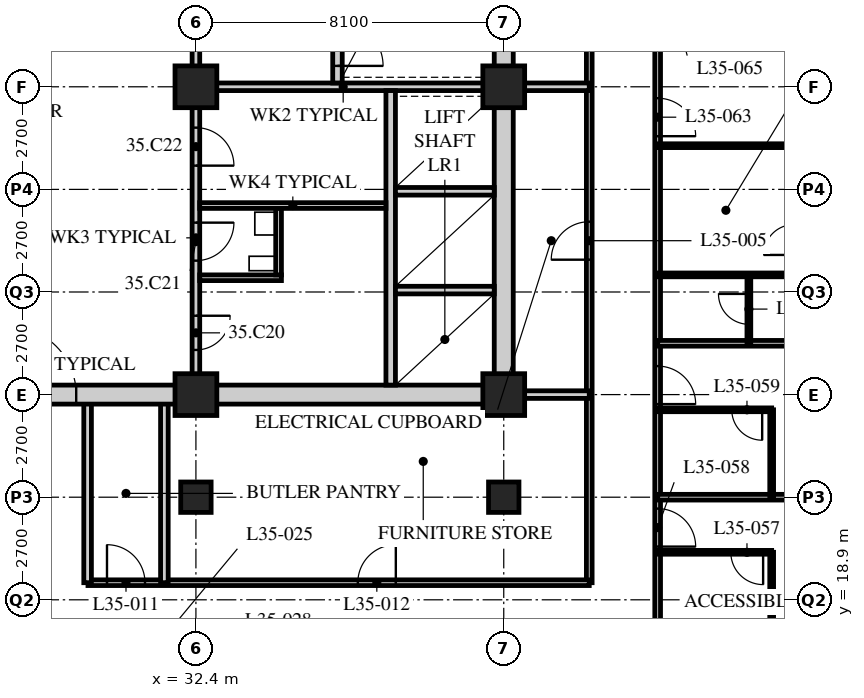
"""IFC4 building model, lengths in metres.
Left out: names, types, materials, properties, quantities, classifications, styles, units other than length and angle.
Written with IfcOpenShell. Run it as: python <this file> out.ifc"""

import sys

from ifc_helpers import new_model, si_unit, direction, frame, frame_2d, origin, origin_2d, place, context, subcontext, project, spatial, rectangle, hollow_rectangle, extrude, element, fill, save


model = new_model("IFC4")
c1 = context("Model", 3, precision=1e-05, world=origin(), true_north=direction((0.0, 1.0)))
c2 = subcontext(c1, "Body", "Model", "MODEL_VIEW")
j1 = project(units=[si_unit("LENGTHUNIT", "METRE"), si_unit("PLANEANGLEUNIT", "RADIAN")], contexts=[c1])
p1 = place(None, origin())
s1 = spatial("IfcSite", under=j1, at=p1, CompositionType="ELEMENT")
p2 = place(p1, origin())
s2 = spatial("IfcBuilding", under=s1, at=p2, CompositionType="ELEMENT")
p3 = place(p2, frame((0.0, 0.0, 137.4)))
s3 = spatial("IfcBuildingStorey", under=s2, at=p3, CompositionType="ELEMENT", Elevation=137.4)
p4 = place(p3, frame((32.4, 21.6, 0.0), z_axis=(0.0, 0.0, 1.0), x_axis=(1.0, 0.0, 0.0)))
e1 = element("IfcColumn", 1, at=p4, inside=s3, PredefinedType="COLUMN", context=c2, shape_type="SweptSolid", body=[
    extrude(hollow_rectangle(XDim=0.8, YDim=0.8, WallThickness=0.08, at=origin_2d()), origin(), (0.0, 0.0, 1.0), 3.4),
])
for number, where, z_axis, x_axis in (
    (2, (32.4, 24.3, 0.0), (0.0, 0.0, 1.0), (1.0, 0.0, 0.0)),
    (3, (32.4, 32.4, 0.0), (0.0, 0.0, 1.0), (1.0, 0.0, 0.0)),
):
    element("IfcColumn", number, at=place(p3, frame(where, z_axis=z_axis, x_axis=x_axis)), inside=s3, PredefinedType="COLUMN", context=c2, shape_type="SweptSolid", body=[
        extrude(hollow_rectangle(XDim=1.1, YDim=1.1, WallThickness=0.1, at=origin_2d()), origin(), (0.0, 0.0, 1.0), 3.4),
    ])
p5 = place(p3, frame((40.5, 21.6, 0.0), z_axis=(0.0, 0.0, 1.0), x_axis=(1.0, 0.0, 0.0)))
e4 = element("IfcColumn", 4, at=p5, inside=s3, PredefinedType="COLUMN", context=c2, shape_type="SweptSolid", body=[
    extrude(hollow_rectangle(XDim=0.8, YDim=0.8, WallThickness=0.08, at=origin_2d()), origin(), (0.0, 0.0, 1.0), 3.4),
])
for number, where, z_axis, x_axis in (
    (5, (40.5, 24.3, 0.0), (0.0, 0.0, 1.0), (1.0, 0.0, 0.0)),
    (6, (40.5, 32.4, 0.0), (0.0, 0.0, 1.0), (1.0, 0.0, 0.0)),
):
    element("IfcColumn", number, at=place(p3, frame(where, z_axis=z_axis, x_axis=x_axis)), inside=s3, PredefinedType="COLUMN", context=c2, shape_type="SweptSolid", body=[
        extrude(hollow_rectangle(XDim=1.1, YDim=1.1, WallThickness=0.1, at=origin_2d()), origin(), (0.0, 0.0, 1.0), 3.4),
    ])
p6 = place(p3, frame((44.55, 17.55, 0.0), z_axis=(0.0, 0.0, 1.0), x_axis=(0.0, 1.0, 0.0)))
e7 = element("IfcWall", 7, at=p6, inside=s3, PredefinedType="PARTITIONING", context=c2, shape_type="SweptSolid", body=[
    extrude(rectangle(XDim=28.35, YDim=0.15, at=frame_2d((14.175, 0.0))), origin(), (0.0, 0.0, 1.0), 3.19),
])
p7 = place(p6, frame((2.75, 0.0, 0.0)))
e8 = element("IfcOpeningElement", 8, at=p7, cuts=e7, PredefinedType="OPENING", context=c2, shape_type="SweptSolid", body=[
    extrude(rectangle(XDim=1.0, YDim=2.1, at=frame_2d((0.5, 1.05))), frame((0.0, 0.085, 0.0), z_axis=(0.0, -1.0, 0.0), x_axis=(1.0, 0.0, 0.0)), (0.0, 0.0, 1.0), 0.17),
])
p8 = place(p6, frame((6.5, 0.0, 0.0)))
e9 = element("IfcOpeningElement", 9, at=p8, cuts=e7, PredefinedType="OPENING", context=c2, shape_type="SweptSolid", body=[
    extrude(rectangle(XDim=1.0, YDim=2.1, at=frame_2d((0.5, 1.05))), frame((0.0, 0.085, 0.0), z_axis=(0.0, -1.0, 0.0), x_axis=(1.0, 0.0, 0.0)), (0.0, 0.0, 1.0), 0.17),
])
p9 = place(p6, frame((13.55, 0.0, 0.0)))
e10 = element("IfcOpeningElement", 10, at=p9, cuts=e7, PredefinedType="OPENING", context=c2, shape_type="SweptSolid", body=[
    extrude(rectangle(XDim=1.0, YDim=2.1, at=frame_2d((0.5, 1.05))), frame((0.0, 0.085, 0.0), z_axis=(0.0, -1.0, 0.0), x_axis=(1.0, 0.0, 0.0)), (0.0, 0.0, 1.0), 0.17),
])
p10 = place(p6, frame((18.1, 0.0, 0.0)))
e11 = element("IfcOpeningElement", 11, at=p10, cuts=e7, PredefinedType="OPENING", context=c2, shape_type="SweptSolid", body=[
    extrude(rectangle(XDim=1.0, YDim=2.1, at=frame_2d((0.5, 1.05))), frame((0.0, 0.085, 0.0), z_axis=(0.0, -1.0, 0.0), x_axis=(1.0, 0.0, 0.0)), (0.0, 0.0, 1.0), 0.17),
])
p11 = place(p6, frame((26.75, 0.0, 0.0)))
e12 = element("IfcOpeningElement", 12, at=p11, cuts=e7, PredefinedType="OPENING", context=c2, shape_type="SweptSolid", body=[
    extrude(rectangle(XDim=1.0, YDim=2.1, at=frame_2d((0.5, 1.05))), frame((0.0, 0.085, 0.0), z_axis=(0.0, -1.0, 0.0), x_axis=(1.0, 0.0, 0.0)), (0.0, 0.0, 1.0), 0.17),
])
p12 = place(p3, frame((42.75, 19.35, 0.0), z_axis=(0.0, 0.0, 1.0), x_axis=(0.0, 1.0, 0.0)))
e13 = element("IfcWall", 13, at=p12, inside=s3, PredefinedType="PARTITIONING", context=c2, shape_type="SweptSolid", body=[
    extrude(rectangle(XDim=24.75, YDim=0.15, at=frame_2d((12.375, 0.0))), origin(), (0.0, 0.0, 1.0), 3.19),
])
p13 = place(p12, frame((8.5, 0.0, 0.0)))
e14 = element("IfcOpeningElement", 14, at=p13, cuts=e13, PredefinedType="OPENING", context=c2, shape_type="SweptSolid", body=[
    extrude(rectangle(XDim=1.0, YDim=2.1, at=frame_2d((0.5, 1.05))), frame((0.0, 0.085, 0.0), z_axis=(0.0, -1.0, 0.0), x_axis=(1.0, 0.0, 0.0)), (0.0, 0.0, 1.0), 0.17),
])
p14 = place(p12, frame((16.6, 0.0, 0.0)))
e15 = element("IfcOpeningElement", 15, at=p14, cuts=e13, PredefinedType="OPENING", context=c2, shape_type="SweptSolid", body=[
    extrude(rectangle(XDim=1.0, YDim=2.1, at=frame_2d((0.5, 1.05))), frame((0.0, 0.085, 0.0), z_axis=(0.0, -1.0, 0.0), x_axis=(1.0, 0.0, 0.0)), (0.0, 0.0, 1.0), 0.17),
])
p15 = place(p3, frame((29.56, 19.35, 0.0), z_axis=(0.0, 0.0, 1.0), x_axis=(1.0, 0.0, 0.0)))
e16 = element("IfcWall", 16, at=p15, inside=s3, PredefinedType="PARTITIONING", context=c2, shape_type="SweptSolid", body=[
    extrude(rectangle(XDim=13.19, YDim=0.15, at=frame_2d((6.595, 0.0))), origin(), (0.0, 0.0, 1.0), 3.19),
])
p16 = place(p15, frame((0.5, 0.0, 0.0)))
e17 = element("IfcOpeningElement", 17, at=p16, cuts=e16, PredefinedType="OPENING", context=c2, shape_type="SweptSolid", body=[
    extrude(rectangle(XDim=1.0, YDim=2.1, at=frame_2d((0.5, 1.05))), frame((0.0, 0.085, 0.0), z_axis=(0.0, -1.0, 0.0), x_axis=(1.0, 0.0, 0.0)), (0.0, 0.0, 1.0), 0.17),
])
p17 = place(p15, frame((7.1, 0.0, 0.0)))
e18 = element("IfcOpeningElement", 18, at=p17, cuts=e16, PredefinedType="OPENING", context=c2, shape_type="SweptSolid", body=[
    extrude(rectangle(XDim=1.0, YDim=2.1, at=frame_2d((0.5, 1.05))), frame((0.0, 0.085, 0.0), z_axis=(0.0, -1.0, 0.0), x_axis=(1.0, 0.0, 0.0)), (0.0, 0.0, 1.0), 0.17),
])
p18 = place(p3, frame((40.5, 32.4, 0.0), z_axis=(0.0, 0.0, 1.0), x_axis=(1.0, 0.0, 0.0)))
e19 = element("IfcWall", 19, at=p18, inside=s3, PredefinedType="SOLIDWALL", context=c2, shape_type="SweptSolid", body=[
    extrude(rectangle(XDim=2.25, YDim=0.2, at=frame_2d((1.125, 0.0))), origin(), (0.0, 0.0, 1.0), 3.19),
])
for number, where, z_axis, x_axis in (
    (20, (31.57, 19.35, 0.0), (0.0, 0.0, 1.0), (0.0, 1.0, 0.0)),
    (21, (29.55, 19.35, 0.0), (0.0, 0.0, 1.0), (0.0, 1.0, 0.0)),
):
    element("IfcWall", number, at=place(p3, frame(where, z_axis=z_axis, x_axis=x_axis)), inside=s3, PredefinedType="SOLIDWALL", context=c2, shape_type="SweptSolid", body=[
        extrude(rectangle(XDim=4.95, YDim=0.2, at=frame_2d((2.475, 0.0))), origin(), (0.0, 0.0, 1.0), 3.19),
    ])
p19 = place(p3, frame((40.5, 24.3, 0.0), z_axis=(0.0, 0.0, 1.0), x_axis=(1.0, 0.0, 0.0)))
e22 = element("IfcWall", 22, at=p19, inside=s3, PredefinedType="SOLIDWALL", context=c2, shape_type="SweptSolid", body=[
    extrude(rectangle(XDim=2.25, YDim=0.2, at=frame_2d((1.125, 0.0))), origin(), (0.0, 0.0, 1.0), 3.19),
])
p20 = place(p3, frame((47.55, 17.55, 0.0), z_axis=(0.0, 0.0, 1.0), x_axis=(0.0, 1.0, 0.0)))
e23 = element("IfcWall", 23, at=p20, inside=s3, PredefinedType="PARTITIONING", context=c2, shape_type="SweptSolid", body=[
    extrude(rectangle(XDim=2.6, YDim=0.1, at=frame_2d((1.3, 0.0))), origin(), (0.0, 0.0, 1.0), 3.19),
])
p21 = place(p3, frame((44.55, 20.15, 0.0), z_axis=(0.0, 0.0, 1.0), x_axis=(1.0, 0.0, 0.0)))
e24 = element("IfcWall", 24, at=p21, inside=s3, PredefinedType="PARTITIONING", context=c2, shape_type="SweptSolid", body=[
    extrude(rectangle(XDim=3.0, YDim=0.1, at=frame_2d((1.5, 0.0))), origin(), (0.0, 0.0, 1.0), 3.19),
])
p22 = place(p21, frame((1.925, 0.0, 0.0)))
e25 = element("IfcOpeningElement", 25, at=p22, cuts=e24, PredefinedType="OPENING", context=c2, shape_type="SweptSolid", body=[
    extrude(rectangle(XDim=0.85, YDim=2.1, at=frame_2d((0.425, 1.05))), frame((0.0, 0.06, 0.0), z_axis=(0.0, -1.0, 0.0), x_axis=(1.0, 0.0, 0.0)), (0.0, 0.0, 1.0), 0.12),
])
p23 = place(p3, frame((44.55, 21.6, 0.0), z_axis=(0.0, 0.0, 1.0), x_axis=(1.0, 0.0, 0.0)))
e26 = element("IfcWall", 26, at=p23, inside=s3, PredefinedType="PARTITIONING", context=c2, shape_type="SweptSolid", body=[
    extrude(rectangle(XDim=11.85, YDim=0.15, at=frame_2d((5.925, 0.0))), origin(), (0.0, 0.0, 1.0), 2.578),
])
p24 = place(p3, frame((47.55, 21.6, 0.0), z_axis=(0.0, 0.0, 1.0), x_axis=(0.0, 1.0, 0.0)))
e27 = element("IfcWall", 27, at=p24, inside=s3, PredefinedType="PARTITIONING", context=c2, shape_type="SweptSolid", body=[
    extrude(rectangle(XDim=2.3, YDim=0.1, at=frame_2d((1.15, 0.0))), origin(), (0.0, 0.0, 1.0), 3.19),
])
p25 = place(p3, frame((44.55, 23.9, 0.0), z_axis=(0.0, 0.0, 1.0), x_axis=(1.0, 0.0, 0.0)))
e28 = element("IfcWall", 28, at=p25, inside=s3, PredefinedType="PARTITIONING", context=c2, shape_type="SweptSolid", body=[
    extrude(rectangle(XDim=3.0, YDim=0.1, at=frame_2d((1.5, 0.0))), origin(), (0.0, 0.0, 1.0), 3.19),
])
p26 = place(p25, frame((1.95, 0.0, 0.0)))
e29 = element("IfcOpeningElement", 29, at=p26, cuts=e28, PredefinedType="OPENING", context=c2, shape_type="SweptSolid", body=[
    extrude(rectangle(XDim=0.8, YDim=2.1, at=frame_2d((0.4, 1.05))), frame((0.0, 0.06, 0.0), z_axis=(0.0, -1.0, 0.0), x_axis=(1.0, 0.0, 0.0)), (0.0, 0.0, 1.0), 0.12),
])
p27 = place(p3, frame((44.55, 25.65, 0.0), z_axis=(0.0, 0.0, 1.0), x_axis=(1.0, 0.0, 0.0)))
e30 = element("IfcWall", 30, at=p27, inside=s3, PredefinedType="PARTITIONING", context=c2, shape_type="SweptSolid", body=[
    extrude(rectangle(XDim=11.85, YDim=0.15, at=frame_2d((5.925, 0.0))), origin(), (0.0, 0.0, 1.0), 3.19),
])
p28 = place(p3, frame((46.95, 25.65, 0.0), z_axis=(0.0, 0.0, 1.0), x_axis=(0.0, 1.0, 0.0)))
e31 = element("IfcWall", 31, at=p28, inside=s3, PredefinedType="PARTITIONING", context=c2, shape_type="SweptSolid", body=[
    extrude(rectangle(XDim=1.8, YDim=0.1, at=frame_2d((0.9, 0.0))), origin(), (0.0, 0.0, 1.0), 3.19),
])
p29 = place(p28, frame((0.5, 0.0, 0.0)))
e32 = element("IfcOpeningElement", 32, at=p29, cuts=e31, PredefinedType="OPENING", context=c2, shape_type="SweptSolid", body=[
    extrude(rectangle(XDim=0.8, YDim=2.1, at=frame_2d((0.4, 1.05))), frame((0.0, 0.06, 0.0), z_axis=(0.0, -1.0, 0.0), x_axis=(1.0, 0.0, 0.0)), (0.0, 0.0, 1.0), 0.12),
])
for number, where, z_axis, x_axis in (
    (33, (44.55, 27.45, 0.0), (0.0, 0.0, 1.0), (1.0, 0.0, 0.0)),
    (34, (44.55, 30.85, 0.0), (0.0, 0.0, 1.0), (1.0, 0.0, 0.0)),
):
    element("IfcWall", number, at=place(p3, frame(where, z_axis=z_axis, x_axis=x_axis)), inside=s3, PredefinedType="PARTITIONING", context=c2, shape_type="SweptSolid", body=[
        extrude(rectangle(XDim=3.59, YDim=0.1, at=frame_2d((1.795, 0.0))), origin(), (0.0, 0.0, 1.0), 3.19),
    ])
p30 = place(p3, frame((15.95, 24.3, 0.0), z_axis=(0.0, 0.0, 1.0), x_axis=(1.0, 0.0, 0.0)))
e35 = element("IfcWall", 35, at=p30, inside=s3, PredefinedType="SOLIDWALL", context=c2, shape_type="SweptSolid", body=[
    extrude(rectangle(XDim=24.8, YDim=0.5, at=frame_2d((12.4, 0.0))), origin(), (0.0, 0.0, 1.0), 2.54),
])
p31 = place(p30, frame((11.5, 0.0, 0.0)))
e36 = element("IfcOpeningElement", 36, at=p31, cuts=e35, PredefinedType="OPENING", context=c2, shape_type="SweptSolid", body=[
    extrude(rectangle(XDim=1.8, YDim=2.4, at=frame_2d((0.9, 1.2))), frame((0.0, 0.26, 0.0), z_axis=(0.0, -1.0, 0.0), x_axis=(1.0, 0.0, 0.0)), (0.0, 0.0, 1.0), 0.52),
])
p32 = place(p3, frame((40.5, 24.55, 0.0), z_axis=(0.0, 0.0, 1.0), x_axis=(0.0, 1.0, 0.0)))
e37 = element("IfcWall", 37, at=p32, inside=s3, PredefinedType="SOLIDWALL", context=c2, shape_type="SweptSolid", body=[
    extrude(rectangle(XDim=15.7, YDim=0.5, at=frame_2d((7.85, 0.0))), origin(), (0.0, 0.0, 1.0), 2.578),
])
p33 = place(p3, frame((32.3, 32.4, 0.0), z_axis=(0.0, 0.0, 1.0), x_axis=(1.0, 0.0, 0.0)))
e38 = element("IfcWall", 38, at=p33, inside=s3, PredefinedType="SOLIDWALL", context=c2, shape_type="SweptSolid", body=[
    extrude(rectangle(XDim=7.95, YDim=0.2, at=frame_2d((3.975, 0.0))), origin(), (0.0, 0.0, 1.0), 2.578),
])
p34 = place(p3, frame((32.4, 32.5, 0.0), z_axis=(0.0, 0.0, 1.0), x_axis=(0.0, 1.0, 0.0)))
e39 = element("IfcWall", 39, at=p34, inside=s3, PredefinedType="SOLIDWALL", context=c2, shape_type="SweptSolid", body=[
    extrude(rectangle(XDim=7.75, YDim=0.2, at=frame_2d((3.875, 0.0))), origin(), (0.0, 0.0, 1.0), 2.578),
])
p35 = place(p34, frame((1.9, 0.0, 0.0)))
e40 = element("IfcOpeningElement", 40, at=p35, cuts=e39, PredefinedType="OPENING", context=c2, shape_type="SweptSolid", body=[
    extrude(rectangle(XDim=1.2, YDim=2.1, at=frame_2d((0.6, 1.05))), frame((0.0, 0.11, 0.0), z_axis=(0.0, -1.0, 0.0), x_axis=(1.0, 0.0, 0.0)), (0.0, 0.0, 1.0), 0.22),
])
p36 = place(p3, frame((37.525, 24.55, 0.0), z_axis=(0.0, 0.0, 1.0), x_axis=(0.0, 1.0, 0.0)))
e41 = element("IfcWall", 41, at=p36, inside=s3, PredefinedType="SOLIDWALL", context=c2, shape_type="SweptSolid", body=[
    extrude(rectangle(XDim=7.75, YDim=0.25, at=frame_2d((3.875, 0.0))), origin(), (0.0, 0.0, 1.0), 3.19),
])
for number, where, z_axis, x_axis in (
    (42, (37.65, 27.05, 0.0), (0.0, 0.0, 1.0), (1.0, 0.0, 0.0)),
    (43, (37.65, 29.65, 0.0), (0.0, 0.0, 1.0), (1.0, 0.0, 0.0)),
):
    element("IfcWall", number, at=place(p3, frame(where, z_axis=z_axis, x_axis=x_axis)), inside=s3, PredefinedType="SOLIDWALL", context=c2, shape_type="SweptSolid", body=[
        extrude(rectangle(XDim=2.6, YDim=0.2, at=frame_2d((1.3, 0.0))), origin(), (0.0, 0.0, 1.0), 3.19),
    ])
p37 = place(p3, frame((36.125, 32.5, 0.0), z_axis=(0.0, 0.0, 1.0), x_axis=(0.0, 1.0, 0.0)))
e44 = element("IfcWall", 44, at=p37, inside=s3, PredefinedType="SOLIDWALL", context=c2, shape_type="SweptSolid", body=[
    extrude(rectangle(XDim=7.75, YDim=0.25, at=frame_2d((3.875, 0.0))), origin(), (0.0, 0.0, 1.0), 3.19),
])
p38 = place(p37, frame((0.45, 0.0, 0.0)))
e45 = element("IfcOpeningElement", 45, at=p38, cuts=e44, PredefinedType="OPENING", context=c2, shape_type="SweptSolid", body=[
    extrude(rectangle(XDim=1.2, YDim=2.1, at=frame_2d((0.6, 1.05))), frame((0.0, 0.135, 0.0), z_axis=(0.0, -1.0, 0.0), x_axis=(1.0, 0.0, 0.0)), (0.0, 0.0, 1.0), 0.27),
])
p39 = place(p3, frame((32.4, 24.55, 0.0), z_axis=(0.0, 0.0, 1.0), x_axis=(0.0, 1.0, 0.0)))
e46 = element("IfcWall", 46, at=p39, inside=s3, PredefinedType="PARTITIONING", context=c2, shape_type="SweptSolid", body=[
    extrude(rectangle(XDim=7.75, YDim=0.2, at=frame_2d((3.875, 0.0))), origin(), (0.0, 0.0, 1.0), 2.578),
])
p40 = place(p39, frame((0.925, 0.0, 0.0)))
e47 = element("IfcOpeningElement", 47, at=p40, cuts=e46, PredefinedType="OPENING", context=c2, shape_type="SweptSolid", body=[
    extrude(rectangle(XDim=0.9, YDim=2.1, at=frame_2d((0.45, 1.05))), frame((0.0, 0.11, 0.0), z_axis=(0.0, -1.0, 0.0), x_axis=(1.0, 0.0, 0.0)), (0.0, 0.0, 1.0), 0.22),
])
p41 = place(p39, frame((3.275, 0.0, 0.0)))
e48 = element("IfcOpeningElement", 48, at=p41, cuts=e46, PredefinedType="OPENING", context=c2, shape_type="SweptSolid", body=[
    extrude(rectangle(XDim=1.0, YDim=2.1, at=frame_2d((0.5, 1.05))), frame((0.0, 0.11, 0.0), z_axis=(0.0, -1.0, 0.0), x_axis=(1.0, 0.0, 0.0)), (0.0, 0.0, 1.0), 0.22),
])
p42 = place(p39, frame((5.775, 0.0, 0.0)))
e49 = element("IfcOpeningElement", 49, at=p42, cuts=e46, PredefinedType="OPENING", context=c2, shape_type="SweptSolid", body=[
    extrude(rectangle(XDim=1.0, YDim=2.1, at=frame_2d((0.5, 1.05))), frame((0.0, 0.11, 0.0), z_axis=(0.0, -1.0, 0.0), x_axis=(1.0, 0.0, 0.0)), (0.0, 0.0, 1.0), 0.22),
])
p43 = place(p3, frame((32.5, 27.375, 0.0), z_axis=(0.0, 0.0, 1.0), x_axis=(1.0, 0.0, 0.0)))
e50 = element("IfcWall", 50, at=p43, inside=s3, PredefinedType="PARTITIONING", context=c2, shape_type="SweptSolid", body=[
    extrude(rectangle(XDim=2.15, YDim=0.15, at=frame_2d((1.075, 0.0))), origin(), (0.0, 0.0, 1.0), 3.19),
])
p44 = place(p3, frame((32.5, 29.275, 0.0), z_axis=(0.0, 0.0, 1.0), x_axis=(1.0, 0.0, 0.0)))
e51 = element("IfcWall", 51, at=p44, inside=s3, PredefinedType="PARTITIONING", context=c2, shape_type="SweptSolid", body=[
    extrude(rectangle(XDim=4.9, YDim=0.15, at=frame_2d((2.45, 0.0))), origin(), (0.0, 0.0, 1.0), 3.19),
])
p45 = place(p3, frame((34.575, 27.45, 0.0), z_axis=(0.0, 0.0, 1.0), x_axis=(0.0, 1.0, 0.0)))
e52 = element("IfcWall", 52, at=p45, inside=s3, PredefinedType="PARTITIONING", context=c2, shape_type="SweptSolid", body=[
    extrude(rectangle(XDim=1.75, YDim=0.15, at=frame_2d((0.875, 0.0))), origin(), (0.0, 0.0, 1.0), 3.19),
])
p46 = place(p13, origin())
e53 = element("IfcDoor", 53, at=p46, inside=s3, OperationType="SINGLE_SWING_LEFT", PredefinedType="DOOR", context=c2, shape_type="SweptSolid", body=[
    extrude(rectangle(XDim=1.0, YDim=2.1, at=frame_2d((0.5, 1.05))), frame((0.0, 0.025, 0.0), z_axis=(0.0, -1.0, 0.0), x_axis=(1.0, 0.0, 0.0)), (0.0, 0.0, 1.0), 0.05),
])
fill(e14, e53)
p47 = place(p16, origin())
e54 = element("IfcDoor", 54, at=p47, inside=s3, OperationType="SINGLE_SWING_LEFT", PredefinedType="DOOR", context=c2, shape_type="SweptSolid", body=[
    extrude(rectangle(XDim=1.0, YDim=2.1, at=frame_2d((0.5, 1.05))), frame((0.0, 0.025, 0.0), z_axis=(0.0, -1.0, 0.0), x_axis=(1.0, 0.0, 0.0)), (0.0, 0.0, 1.0), 0.05),
])
fill(e17, e54)
p48 = place(p17, origin())
e55 = element("IfcDoor", 55, at=p48, inside=s3, OperationType="SINGLE_SWING_RIGHT", PredefinedType="DOOR", context=c2, shape_type="SweptSolid", body=[
    extrude(rectangle(XDim=1.0, YDim=2.1, at=frame_2d((0.5, 1.05))), frame((0.0, 0.025, 0.0), z_axis=(0.0, -1.0, 0.0), x_axis=(1.0, 0.0, 0.0)), (0.0, 0.0, 1.0), 0.05),
])
fill(e18, e55)
p49 = place(p22, origin())
e56 = element("IfcDoor", 56, at=p49, inside=s3, OperationType="SINGLE_SWING_LEFT", PredefinedType="DOOR", context=c2, shape_type="SweptSolid", body=[
    extrude(rectangle(XDim=0.85, YDim=2.1, at=frame_2d((0.425, 1.05))), frame((0.0, 0.025, 0.0), z_axis=(0.0, -1.0, 0.0), x_axis=(1.0, 0.0, 0.0)), (0.0, 0.0, 1.0), 0.05),
])
fill(e25, e56)
p50 = place(p7, origin())
e57 = element("IfcDoor", 57, at=p50, inside=s3, OperationType="SINGLE_SWING_RIGHT", PredefinedType="DOOR", context=c2, shape_type="SweptSolid", body=[
    extrude(rectangle(XDim=1.0, YDim=2.1, at=frame_2d((0.5, 1.05))), frame((0.0, 0.025, 0.0), z_axis=(0.0, -1.0, 0.0), x_axis=(1.0, 0.0, 0.0)), (0.0, 0.0, 1.0), 0.05),
])
fill(e8, e57)
p51 = place(p26, origin())
e58 = element("IfcDoor", 58, at=p51, inside=s3, OperationType="SINGLE_SWING_LEFT", PredefinedType="DOOR", context=c2, shape_type="SweptSolid", body=[
    extrude(rectangle(XDim=0.8, YDim=2.1, at=frame_2d((0.4, 1.05))), frame((0.0, 0.025, 0.0), z_axis=(0.0, -1.0, 0.0), x_axis=(1.0, 0.0, 0.0)), (0.0, 0.0, 1.0), 0.05),
])
fill(e29, e58)
p52 = place(p8, origin())
e59 = element("IfcDoor", 59, at=p52, inside=s3, OperationType="SINGLE_SWING_RIGHT", PredefinedType="DOOR", context=c2, shape_type="SweptSolid", body=[
    extrude(rectangle(XDim=1.0, YDim=2.1, at=frame_2d((0.5, 1.05))), frame((0.0, 0.025, 0.0), z_axis=(0.0, -1.0, 0.0), x_axis=(1.0, 0.0, 0.0)), (0.0, 0.0, 1.0), 0.05),
])
fill(e9, e59)
p53 = place(p29, origin())
e60 = element("IfcDoor", 60, at=p53, inside=s3, OperationType="SINGLE_SWING_RIGHT", PredefinedType="DOOR", context=c2, shape_type="SweptSolid", body=[
    extrude(rectangle(XDim=0.8, YDim=2.1, at=frame_2d((0.4, 1.05))), frame((0.0, 0.025, 0.0), z_axis=(0.0, -1.0, 0.0), x_axis=(1.0, 0.0, 0.0)), (0.0, 0.0, 1.0), 0.05),
])
fill(e32, e60)
p54 = place(p9, origin())
e61 = element("IfcDoor", 61, at=p54, inside=s3, OperationType="SINGLE_SWING_RIGHT", PredefinedType="DOOR", context=c2, shape_type="SweptSolid", body=[
    extrude(rectangle(XDim=1.0, YDim=2.1, at=frame_2d((0.5, 1.05))), frame((0.0, 0.025, 0.0), z_axis=(0.0, -1.0, 0.0), x_axis=(1.0, 0.0, 0.0)), (0.0, 0.0, 1.0), 0.05),
])
fill(e10, e61)
p55 = place(p40, origin())
e62 = element("IfcDoor", 62, at=p55, inside=s3, OperationType="SINGLE_SWING_LEFT", PredefinedType="DOOR", context=c2, shape_type="SweptSolid", body=[
    extrude(rectangle(XDim=0.9, YDim=2.1, at=frame_2d((0.45, 1.05))), frame((0.0, 0.025, 0.0), z_axis=(0.0, -1.0, 0.0), x_axis=(1.0, 0.0, 0.0)), (0.0, 0.0, 1.0), 0.05),
])
fill(e47, e62)
p56 = place(p41, origin())
e63 = element("IfcDoor", 63, at=p56, inside=s3, OperationType="SINGLE_SWING_LEFT", PredefinedType="DOOR", context=c2, shape_type="SweptSolid", body=[
    extrude(rectangle(XDim=1.0, YDim=2.1, at=frame_2d((0.5, 1.05))), frame((0.0, 0.025, 0.0), z_axis=(0.0, -1.0, 0.0), x_axis=(1.0, 0.0, 0.0)), (0.0, 0.0, 1.0), 0.05),
])
fill(e48, e63)
p57 = place(p42, origin())
e64 = element("IfcDoor", 64, at=p57, inside=s3, OperationType="SINGLE_SWING_RIGHT", PredefinedType="DOOR", context=c2, shape_type="SweptSolid", body=[
    extrude(rectangle(XDim=1.0, YDim=2.1, at=frame_2d((0.5, 1.05))), frame((0.0, 0.025, 0.0), z_axis=(0.0, -1.0, 0.0), x_axis=(1.0, 0.0, 0.0)), (0.0, 0.0, 1.0), 0.05),
])
fill(e49, e64)
p58 = place(p38, origin())
e65 = element("IfcDoor", 65, at=p58, inside=s3, OperationType="SINGLE_SWING_RIGHT", PredefinedType="DOOR", context=c2, shape_type="SweptSolid", body=[
    extrude(rectangle(XDim=1.2, YDim=2.1, at=frame_2d((0.6, 1.05))), frame((0.0, 0.025, 0.0), z_axis=(0.0, -1.0, 0.0), x_axis=(1.0, 0.0, 0.0)), (0.0, 0.0, 1.0), 0.05),
])
fill(e45, e65)
p59 = place(p31, origin())
e66 = element("IfcDoor", 66, at=p59, inside=s3, OperationType="DOUBLE_DOOR_SINGLE_SWING", PredefinedType="DOOR", context=c2, shape_type="SweptSolid", body=[
    extrude(rectangle(XDim=1.8, YDim=2.4, at=frame_2d((0.9, 1.2))), frame((0.0, 0.025, 0.0), z_axis=(0.0, -1.0, 0.0), x_axis=(1.0, 0.0, 0.0)), (0.0, 0.0, 1.0), 0.05),
])
fill(e36, e66)
save(model, sys.argv[1])
